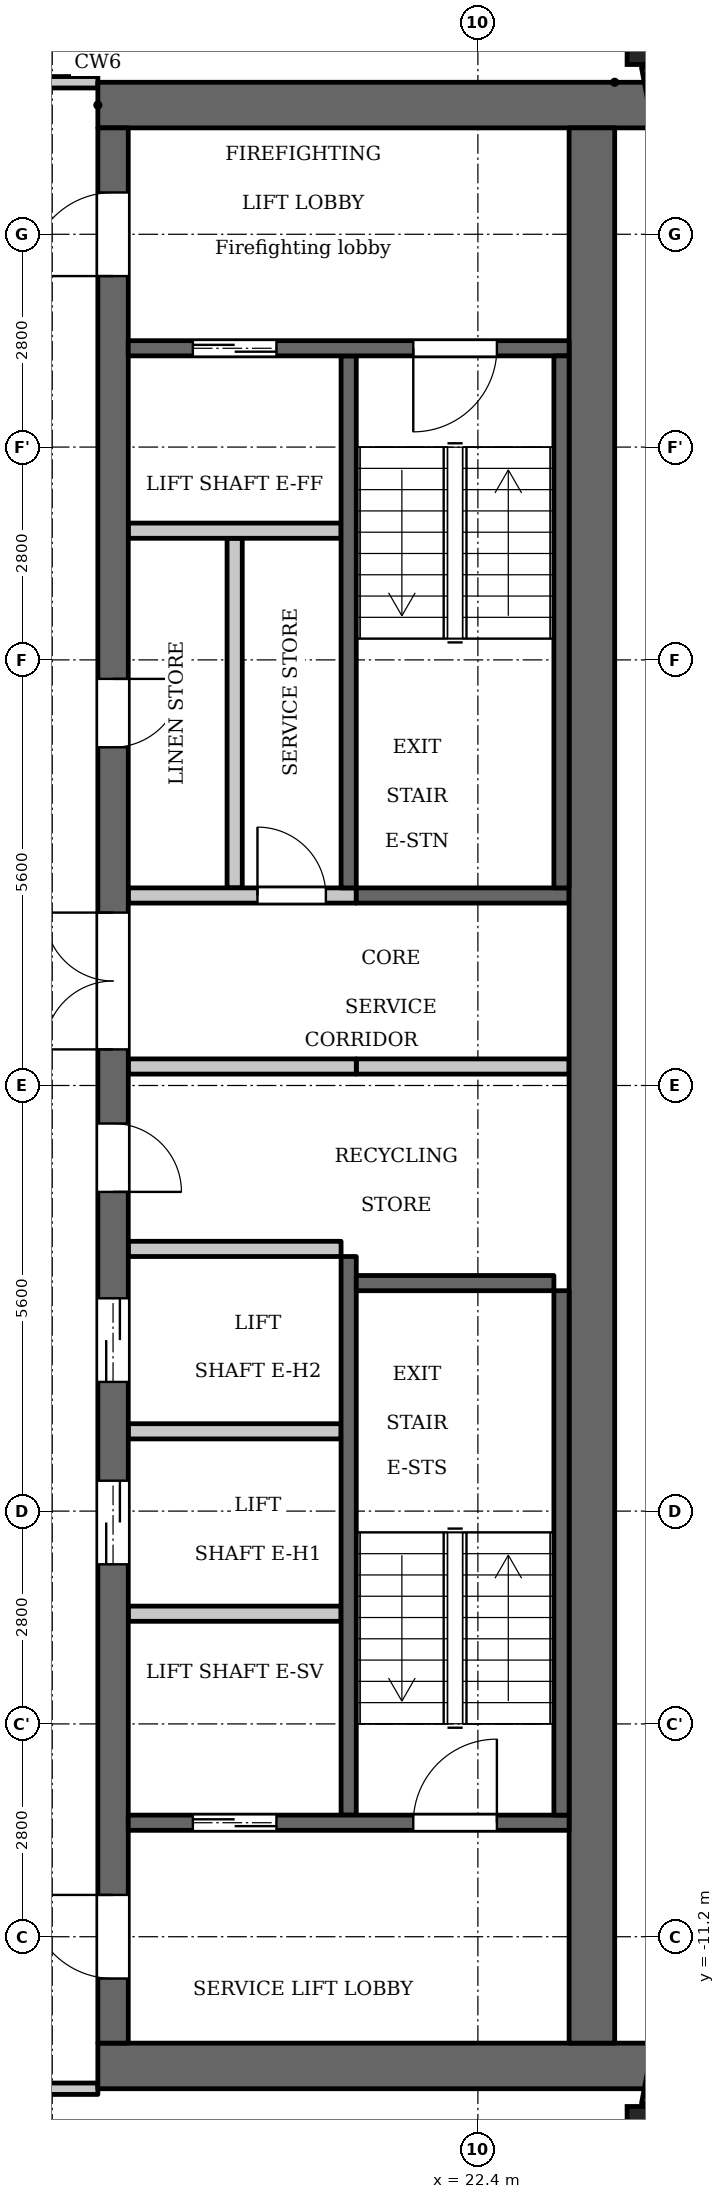
"""IFC4 building model, lengths in metres.
Left out: names, types, materials, properties, quantities, classifications, styles, units other than length and angle.
Written with IfcOpenShell. Run it as: python <this file> out.ifc"""

import sys

from ifc_helpers import new_model, si_unit, direction, frame, frame_2d, origin, origin_2d, place, context, subcontext, project, spatial, rectangle, extrude, element, fill, save


model = new_model("IFC4")
c1 = context("Model", 3, precision=1e-05, world=origin(), true_north=direction((0.0, 1.0)))
c2 = subcontext(c1, "Body", "Model", "MODEL_VIEW")
j1 = project(units=[si_unit("LENGTHUNIT", "METRE"), si_unit("PLANEANGLEUNIT", "RADIAN")], contexts=[c1])
p1 = place(None, origin())
s1 = spatial("IfcSite", under=j1, at=p1, CompositionType="ELEMENT")
p2 = place(p1, origin())
s2 = spatial("IfcBuilding", under=s1, at=p2, CompositionType="ELEMENT")
p3 = place(p2, frame((0.0, 0.0, 266.2)))
s3 = spatial("IfcBuildingStorey", under=s2, at=p3, CompositionType="ELEMENT", Elevation=266.2)
for number, where, z_axis, x_axis in (
    (1, (24.738, -13.809, 0.0), (0.0, 0.0, 1.0), (1.0, 0.0, 0.0)),
    (2, (24.738, 13.809, 0.0), (0.0, 0.0, 1.0), (1.0, 0.0, 0.0)),
):
    element("IfcColumn", number, at=place(p3, frame(where, z_axis=z_axis, x_axis=x_axis)), inside=s3, PredefinedType="COLUMN", context=c2, shape_type="SweptSolid", body=[
        extrude(rectangle(XDim=0.75, YDim=0.75, at=origin_2d()), origin(), (0.0, 0.0, 1.0), 3.5),
    ])
for number, where, z_axis, x_axis in (
    (3, (24.7, -13.42, 0.0), (0.0, 0.0, 1.0), (0.187, 0.982, 0.0)),
    (4, (25.053, 11.572, 0.0), (0.0, 0.0, 1.0), (-0.187, 0.982, 0.0)),
):
    element("IfcWall", number, at=place(p3, frame(where, z_axis=z_axis, x_axis=x_axis)), inside=s3, PredefinedType="SOLIDWALL", context=c2, shape_type="SweptSolid", body=[
        extrude(rectangle(XDim=1.881, YDim=0.3, at=frame_2d((0.941, 0.0))), origin(), (0.0, 0.0, 1.0), 2.55),
    ])
p4 = place(p3, frame((20.7, 2.6, 0.0), z_axis=(0.0, 0.0, 1.0), x_axis=(0.0, 1.0, 0.0)))
e5 = element("IfcWall", 5, at=p4, inside=s3, PredefinedType="SHEAR", context=c2, shape_type="SweptSolid", body=[
    extrude(rectangle(XDim=7.0, YDim=0.2, at=frame_2d((3.5, 0.0))), origin(), (0.0, 0.0, 1.0), 3.2),
])
p5 = place(p3, frame((20.7, -9.6, 0.0), z_axis=(0.0, 0.0, 1.0), x_axis=(0.0, 1.0, 0.0)))
e6 = element("IfcWall", 6, at=p5, inside=s3, PredefinedType="SHEAR", context=c2, shape_type="SweptSolid", body=[
    extrude(rectangle(XDim=7.35, YDim=0.2, at=frame_2d((3.675, 0.0))), origin(), (0.0, 0.0, 1.0), 3.2),
])
p6 = place(p3, frame((20.8, 2.5, 0.0), z_axis=(0.0, 0.0, 1.0), x_axis=(1.0, 0.0, 0.0)))
e7 = element("IfcWall", 7, at=p6, inside=s3, PredefinedType="SHEAR", context=c2, shape_type="SweptSolid", body=[
    extrude(rectangle(XDim=2.8, YDim=0.2, at=frame_2d((1.4, 0.0))), origin(), (0.0, 0.0, 1.0), 3.2),
])
p7 = place(p3, frame((20.8, 0.25, 0.0), z_axis=(0.0, 0.0, 1.0), x_axis=(1.0, 0.0, 0.0)))
e8 = element("IfcWall", 8, at=p7, inside=s3, PredefinedType="PARTITIONING", context=c2, shape_type="SweptSolid", body=[
    extrude(rectangle(XDim=2.8, YDim=0.2, at=frame_2d((1.4, 0.0))), origin(), (0.0, 0.0, 1.0), 3.2),
])
for number, where, z_axis, x_axis in (
    (9, (17.4, 12.9, 0.0), (0.0, 0.0, 1.0), (1.0, 0.0, 0.0)),
    (10, (17.4, -12.9, 0.0), (0.0, 0.0, 1.0), (1.0, 0.0, 0.0)),
):
    element("IfcWall", number, at=place(p3, frame(where, z_axis=z_axis, x_axis=x_axis)), inside=s3, PredefinedType="SHEAR", context=c2, shape_type="SweptSolid", body=[
        extrude(rectangle(XDim=7.32, YDim=0.6, at=frame_2d((3.66, 0.0))), origin(), (0.0, 0.0, 1.0), 3.2),
    ])
p8 = place(p3, frame((19.2, 2.6, 0.0), z_axis=(0.0, 0.0, 1.0), x_axis=(0.0, 1.0, 0.0)))
e11 = element("IfcWall", 11, at=p8, inside=s3, PredefinedType="PARTITIONING", context=c2, shape_type="SweptSolid", body=[
    extrude(rectangle(XDim=4.6, YDim=0.2, at=frame_2d((2.3, 0.0))), origin(), (0.0, 0.0, 1.0), 3.2),
])
p9 = place(p3, frame((17.6, -12.6, 0.0), z_axis=(0.0, 0.0, 1.0), x_axis=(0.0, 1.0, 0.0)))
e12 = element("IfcWall", 12, at=p9, inside=s3, PredefinedType="SHEAR", context=c2, shape_type="SweptSolid", body=[
    extrude(rectangle(XDim=25.2, YDim=0.4, at=frame_2d((12.6, 0.0))), origin(), (0.0, 0.0, 1.0), 3.2),
])
p10 = place(p9, frame((6.3, 0.0, 0.0)))
e13 = element("IfcOpeningElement", 13, at=p10, cuts=e12, PredefinedType="OPENING", context=c2, shape_type="SweptSolid", body=[
    extrude(rectangle(XDim=1.1, YDim=2.1, at=frame_2d((0.55, 1.05))), frame((0.0, 0.21, 0.0), z_axis=(0.0, -1.0, 0.0), x_axis=(1.0, 0.0, 0.0)), (0.0, 0.0, 1.0), 0.42),
])
p11 = place(p9, frame((8.7, 0.0, 0.0)))
e14 = element("IfcOpeningElement", 14, at=p11, cuts=e12, PredefinedType="OPENING", context=c2, shape_type="SweptSolid", body=[
    extrude(rectangle(XDim=1.1, YDim=2.1, at=frame_2d((0.55, 1.05))), frame((0.0, 0.21, 0.0), z_axis=(0.0, -1.0, 0.0), x_axis=(1.0, 0.0, 0.0)), (0.0, 0.0, 1.0), 0.42),
])
p12 = place(p9, frame((11.2, 0.0, 0.0)))
e15 = element("IfcOpeningElement", 15, at=p12, cuts=e12, PredefinedType="OPENING", context=c2, shape_type="SweptSolid", body=[
    extrude(rectangle(XDim=0.9, YDim=2.1, at=frame_2d((0.45, 1.05))), frame((0.0, 0.21, 0.0), z_axis=(0.0, -1.0, 0.0), x_axis=(1.0, 0.0, 0.0)), (0.0, 0.0, 1.0), 0.42),
])
p13 = place(p9, frame((17.05, 0.0, 0.0)))
e16 = element("IfcOpeningElement", 16, at=p13, cuts=e12, PredefinedType="OPENING", context=c2, shape_type="SweptSolid", body=[
    extrude(rectangle(XDim=0.9, YDim=2.1, at=frame_2d((0.45, 1.05))), frame((0.0, 0.21, 0.0), z_axis=(0.0, -1.0, 0.0), x_axis=(1.0, 0.0, 0.0)), (0.0, 0.0, 1.0), 0.42),
])
p14 = place(p9, frame((23.25, 0.0, 0.0)))
e17 = element("IfcOpeningElement", 17, at=p14, cuts=e12, PredefinedType="OPENING", context=c2, shape_type="SweptSolid", body=[
    extrude(rectangle(XDim=1.1, YDim=2.1, at=frame_2d((0.55, 1.05))), frame((0.0, 0.21, 0.0), z_axis=(0.0, -1.0, 0.0), x_axis=(1.0, 0.0, 0.0)), (0.0, 0.0, 1.0), 0.42),
])
p15 = place(p9, frame((0.85, 0.0, 0.0)))
e18 = element("IfcOpeningElement", 18, at=p15, cuts=e12, PredefinedType="OPENING", context=c2, shape_type="SweptSolid", body=[
    extrude(rectangle(XDim=1.1, YDim=2.1, at=frame_2d((0.55, 1.05))), frame((0.0, 0.21, 0.0), z_axis=(0.0, -1.0, 0.0), x_axis=(1.0, 0.0, 0.0)), (0.0, 0.0, 1.0), 0.42),
])
p16 = place(p9, frame((13.075, 0.0, 0.0)))
e19 = element("IfcOpeningElement", 19, at=p16, cuts=e12, PredefinedType="OPENING", context=c2, shape_type="SweptSolid", body=[
    extrude(rectangle(XDim=1.8, YDim=2.1, at=frame_2d((0.9, 1.05))), frame((0.0, 0.21, 0.0), z_axis=(0.0, -1.0, 0.0), x_axis=(1.0, 0.0, 0.0)), (0.0, 0.0, 1.0), 0.42),
])
p17 = place(p3, frame((23.9, -12.6, 0.0), z_axis=(0.0, 0.0, 1.0), x_axis=(0.0, 1.0, 0.0)))
e20 = element("IfcWall", 20, at=p17, inside=s3, PredefinedType="SHEAR", context=c2, shape_type="SweptSolid", body=[
    extrude(rectangle(XDim=25.2, YDim=0.6, at=frame_2d((12.6, 0.0))), origin(), (0.0, 0.0, 1.0), 3.2),
])
p18 = place(p3, frame((17.8, -9.7, 0.0), z_axis=(0.0, 0.0, 1.0), x_axis=(1.0, 0.0, 0.0)))
e21 = element("IfcWall", 21, at=p18, inside=s3, PredefinedType="SHEAR", context=c2, shape_type="SweptSolid", body=[
    extrude(rectangle(XDim=5.8, YDim=0.2, at=frame_2d((2.9, 0.0))), origin(), (0.0, 0.0, 1.0), 3.2),
])
p19 = place(p18, frame((0.85, 0.0, 0.0)))
e22 = element("IfcOpeningElement", 22, at=p19, cuts=e21, PredefinedType="OPENING", context=c2, shape_type="SweptSolid", body=[
    extrude(rectangle(XDim=1.1, YDim=2.1, at=frame_2d((0.55, 1.05))), frame((0.0, 0.11, 0.0), z_axis=(0.0, -1.0, 0.0), x_axis=(1.0, 0.0, 0.0)), (0.0, 0.0, 1.0), 0.22),
])
p20 = place(p18, frame((3.75, 0.0, 0.0)))
e23 = element("IfcOpeningElement", 23, at=p20, cuts=e21, PredefinedType="OPENING", context=c2, shape_type="SweptSolid", body=[
    extrude(rectangle(XDim=1.1, YDim=2.1, at=frame_2d((0.55, 1.05))), frame((0.0, 0.11, 0.0), z_axis=(0.0, -1.0, 0.0), x_axis=(1.0, 0.0, 0.0)), (0.0, 0.0, 1.0), 0.22),
])
for number, where, z_axis, x_axis in (
    (24, (17.8, -6.95, 0.0), (0.0, 0.0, 1.0), (1.0, 0.0, 0.0)),
    (25, (17.8, -4.55, 0.0), (0.0, 0.0, 1.0), (1.0, 0.0, 0.0)),
    (26, (17.8, -2.15, 0.0), (0.0, 0.0, 1.0), (1.0, 0.0, 0.0)),
):
    element("IfcWall", number, at=place(p3, frame(where, z_axis=z_axis, x_axis=x_axis)), inside=s3, PredefinedType="PARTITIONING", context=c2, shape_type="SweptSolid", body=[
        extrude(rectangle(XDim=2.8, YDim=0.2, at=frame_2d((1.4, 0.0))), origin(), (0.0, 0.0, 1.0), 3.2),
    ])
p21 = place(p3, frame((17.8, 0.25, 0.0), z_axis=(0.0, 0.0, 1.0), x_axis=(1.0, 0.0, 0.0)))
e27 = element("IfcWall", 27, at=p21, inside=s3, PredefinedType="PARTITIONING", context=c2, shape_type="SweptSolid", body=[
    extrude(rectangle(XDim=3.0, YDim=0.2, at=frame_2d((1.5, 0.0))), origin(), (0.0, 0.0, 1.0), 3.2),
])
p22 = place(p3, frame((17.8, 2.5, 0.0), z_axis=(0.0, 0.0, 1.0), x_axis=(1.0, 0.0, 0.0)))
e28 = element("IfcWall", 28, at=p22, inside=s3, PredefinedType="PARTITIONING", context=c2, shape_type="SweptSolid", body=[
    extrude(rectangle(XDim=3.0, YDim=0.2, at=frame_2d((1.5, 0.0))), origin(), (0.0, 0.0, 1.0), 3.2),
])
p23 = place(p22, frame((1.7, 0.0, 0.0)))
e29 = element("IfcOpeningElement", 29, at=p23, cuts=e28, PredefinedType="OPENING", context=c2, shape_type="SweptSolid", body=[
    extrude(rectangle(XDim=0.9, YDim=2.1, at=frame_2d((0.45, 1.05))), frame((0.0, 0.11, 0.0), z_axis=(0.0, -1.0, 0.0), x_axis=(1.0, 0.0, 0.0)), (0.0, 0.0, 1.0), 0.22),
])
p24 = place(p3, frame((17.8, 7.3, 0.0), z_axis=(0.0, 0.0, 1.0), x_axis=(1.0, 0.0, 0.0)))
e30 = element("IfcWall", 30, at=p24, inside=s3, PredefinedType="PARTITIONING", context=c2, shape_type="SweptSolid", body=[
    extrude(rectangle(XDim=2.8, YDim=0.2, at=frame_2d((1.4, 0.0))), origin(), (0.0, 0.0, 1.0), 3.2),
])
p25 = place(p3, frame((17.8, 9.7, 0.0), z_axis=(0.0, 0.0, 1.0), x_axis=(1.0, 0.0, 0.0)))
e31 = element("IfcWall", 31, at=p25, inside=s3, PredefinedType="SHEAR", context=c2, shape_type="SweptSolid", body=[
    extrude(rectangle(XDim=5.8, YDim=0.2, at=frame_2d((2.9, 0.0))), origin(), (0.0, 0.0, 1.0), 3.2),
])
p26 = place(p25, frame((0.85, 0.0, 0.0)))
e32 = element("IfcOpeningElement", 32, at=p26, cuts=e31, PredefinedType="OPENING", context=c2, shape_type="SweptSolid", body=[
    extrude(rectangle(XDim=1.1, YDim=2.1, at=frame_2d((0.55, 1.05))), frame((0.0, 0.11, 0.0), z_axis=(0.0, -1.0, 0.0), x_axis=(1.0, 0.0, 0.0)), (0.0, 0.0, 1.0), 0.22),
])
p27 = place(p25, frame((3.75, 0.0, 0.0)))
e33 = element("IfcOpeningElement", 33, at=p27, cuts=e31, PredefinedType="OPENING", context=c2, shape_type="SweptSolid", body=[
    extrude(rectangle(XDim=1.1, YDim=2.1, at=frame_2d((0.55, 1.05))), frame((0.0, 0.11, 0.0), z_axis=(0.0, -1.0, 0.0), x_axis=(1.0, 0.0, 0.0)), (0.0, 0.0, 1.0), 0.22),
])
p28 = place(p3, frame((23.5, 2.6, 0.0), z_axis=(0.0, 0.0, 1.0), x_axis=(0.0, 1.0, 0.0)))
e34 = element("IfcWall", 34, at=p28, inside=s3, PredefinedType="SHEAR", context=c2, shape_type="SweptSolid", body=[
    extrude(rectangle(XDim=7.0, YDim=0.2, at=frame_2d((3.5, 0.0))), origin(), (0.0, 0.0, 1.0), 3.2),
])
p29 = place(p3, frame((23.5, -9.6, 0.0), z_axis=(0.0, 0.0, 1.0), x_axis=(0.0, 1.0, 0.0)))
e35 = element("IfcWall", 35, at=p29, inside=s3, PredefinedType="SHEAR", context=c2, shape_type="SweptSolid", body=[
    extrude(rectangle(XDim=6.9, YDim=0.2, at=frame_2d((3.45, 0.0))), origin(), (0.0, 0.0, 1.0), 3.2),
])
p30 = place(p3, frame((20.8, -2.6, 0.0), z_axis=(0.0, 0.0, 1.0), x_axis=(1.0, 0.0, 0.0)))
e36 = element("IfcWall", 36, at=p30, inside=s3, PredefinedType="SHEAR", context=c2, shape_type="SweptSolid", body=[
    extrude(rectangle(XDim=2.6, YDim=0.2, at=frame_2d((1.3, 0.0))), origin(), (0.0, 0.0, 1.0), 3.2),
])
p31 = place(p3, frame((15.075, -13.2, 0.0), z_axis=(0.0, 0.0, 1.0), x_axis=(1.0, 0.0, 0.0)))
e37 = element("IfcWall", 37, at=p31, inside=s3, PredefinedType="PARTITIONING", context=c2, shape_type="SweptSolid", body=[
    extrude(rectangle(XDim=2.325, YDim=0.15, at=frame_2d((1.163, 0.0))), origin(), (0.0, 0.0, 1.0), 3.2),
])
p32 = place(p31, frame((0.575, 0.0, 0.0)))
e38 = element("IfcOpeningElement", 38, at=p32, cuts=e37, PredefinedType="OPENING", context=c2, shape_type="SweptSolid", body=[
    extrude(rectangle(XDim=1.0, YDim=2.1, at=frame_2d((0.5, 1.05))), frame((0.0, 0.085, 0.0), z_axis=(0.0, -1.0, 0.0), x_axis=(1.0, 0.0, 0.0)), (0.0, 0.0, 1.0), 0.17),
])
p33 = place(p3, frame((15.075, 13.2, 0.0), z_axis=(0.0, 0.0, 1.0), x_axis=(1.0, 0.0, 0.0)))
e39 = element("IfcWall", 39, at=p33, inside=s3, PredefinedType="PARTITIONING", context=c2, shape_type="SweptSolid", body=[
    extrude(rectangle(XDim=2.325, YDim=0.15, at=frame_2d((1.163, 0.0))), origin(), (0.0, 0.0, 1.0), 3.2),
])
p34 = place(p33, frame((0.675, 0.0, 0.0)))
e40 = element("IfcOpeningElement", 40, at=p34, cuts=e39, PredefinedType="OPENING", context=c2, shape_type="SweptSolid", body=[
    extrude(rectangle(XDim=1.0, YDim=2.1, at=frame_2d((0.5, 1.05))), frame((0.0, 0.085, 0.0), z_axis=(0.0, -1.0, 0.0), x_axis=(1.0, 0.0, 0.0)), (0.0, 0.0, 1.0), 0.17),
])
p35 = place(p19, origin())
e41 = element("IfcDoor", 41, at=p35, inside=s3, OperationType="DOUBLE_DOOR_SLIDING", PredefinedType="DOOR", context=c2, shape_type="SweptSolid", body=[
    extrude(rectangle(XDim=1.1, YDim=2.1, at=frame_2d((0.55, 1.05))), frame((0.0, 0.025, 0.0), z_axis=(0.0, -1.0, 0.0), x_axis=(1.0, 0.0, 0.0)), (0.0, 0.0, 1.0), 0.05),
])
fill(e22, e41)
p36 = place(p10, origin())
e42 = element("IfcDoor", 42, at=p36, inside=s3, OperationType="DOUBLE_DOOR_SLIDING", PredefinedType="DOOR", context=c2, shape_type="SweptSolid", body=[
    extrude(rectangle(XDim=1.1, YDim=2.1, at=frame_2d((0.55, 1.05))), frame((0.0, 0.025, 0.0), z_axis=(0.0, -1.0, 0.0), x_axis=(1.0, 0.0, 0.0)), (0.0, 0.0, 1.0), 0.05),
])
fill(e13, e42)
p37 = place(p11, origin())
e43 = element("IfcDoor", 43, at=p37, inside=s3, OperationType="DOUBLE_DOOR_SLIDING", PredefinedType="DOOR", context=c2, shape_type="SweptSolid", body=[
    extrude(rectangle(XDim=1.1, YDim=2.1, at=frame_2d((0.55, 1.05))), frame((0.0, 0.025, 0.0), z_axis=(0.0, -1.0, 0.0), x_axis=(1.0, 0.0, 0.0)), (0.0, 0.0, 1.0), 0.05),
])
fill(e14, e43)
p38 = place(p12, origin())
e44 = element("IfcDoor", 44, at=p38, inside=s3, OperationType="SINGLE_SWING_LEFT", PredefinedType="DOOR", context=c2, shape_type="SweptSolid", body=[
    extrude(rectangle(XDim=0.9, YDim=2.1, at=frame_2d((0.45, 1.05))), frame((0.0, 0.025, 0.0), z_axis=(0.0, -1.0, 0.0), x_axis=(1.0, 0.0, 0.0)), (0.0, 0.0, 1.0), 0.05),
])
fill(e15, e44)
p39 = place(p13, origin())
e45 = element("IfcDoor", 45, at=p39, inside=s3, OperationType="SINGLE_SWING_RIGHT", PredefinedType="DOOR", context=c2, shape_type="SweptSolid", body=[
    extrude(rectangle(XDim=0.9, YDim=2.1, at=frame_2d((0.45, 1.05))), frame((0.0, 0.025, 0.0), z_axis=(0.0, -1.0, 0.0), x_axis=(1.0, 0.0, 0.0)), (0.0, 0.0, 1.0), 0.05),
])
fill(e16, e45)
p40 = place(p23, origin())
e46 = element("IfcDoor", 46, at=p40, inside=s3, OperationType="SINGLE_SWING_RIGHT", PredefinedType="DOOR", context=c2, shape_type="SweptSolid", body=[
    extrude(rectangle(XDim=0.9, YDim=2.1, at=frame_2d((0.45, 1.05))), frame((0.0, 0.025, 0.0), z_axis=(0.0, -1.0, 0.0), x_axis=(1.0, 0.0, 0.0)), (0.0, 0.0, 1.0), 0.05),
])
fill(e29, e46)
p41 = place(p26, origin())
e47 = element("IfcDoor", 47, at=p41, inside=s3, OperationType="DOUBLE_DOOR_SLIDING", PredefinedType="DOOR", context=c2, shape_type="SweptSolid", body=[
    extrude(rectangle(XDim=1.1, YDim=2.1, at=frame_2d((0.55, 1.05))), frame((0.0, 0.025, 0.0), z_axis=(0.0, -1.0, 0.0), x_axis=(1.0, 0.0, 0.0)), (0.0, 0.0, 1.0), 0.05),
])
fill(e32, e47)
p42 = place(p14, origin())
e48 = element("IfcDoor", 48, at=p42, inside=s3, OperationType="SINGLE_SWING_RIGHT", PredefinedType="DOOR", context=c2, shape_type="SweptSolid", body=[
    extrude(rectangle(XDim=1.1, YDim=2.1, at=frame_2d((0.55, 1.05))), frame((0.0, 0.025, 0.0), z_axis=(0.0, -1.0, 0.0), x_axis=(1.0, 0.0, 0.0)), (0.0, 0.0, 1.0), 0.05),
])
fill(e17, e48)
p43 = place(p15, origin())
e49 = element("IfcDoor", 49, at=p43, inside=s3, OperationType="SINGLE_SWING_LEFT", PredefinedType="DOOR", context=c2, shape_type="SweptSolid", body=[
    extrude(rectangle(XDim=1.1, YDim=2.1, at=frame_2d((0.55, 1.05))), frame((0.0, 0.025, 0.0), z_axis=(0.0, -1.0, 0.0), x_axis=(1.0, 0.0, 0.0)), (0.0, 0.0, 1.0), 0.05),
])
fill(e18, e49)
p44 = place(p27, origin())
e50 = element("IfcDoor", 50, at=p44, inside=s3, OperationType="SINGLE_SWING_LEFT", PredefinedType="DOOR", context=c2, shape_type="SweptSolid", body=[
    extrude(rectangle(XDim=1.1, YDim=2.1, at=frame_2d((0.55, 1.05))), frame((0.0, 0.025, 0.0), z_axis=(0.0, -1.0, 0.0), x_axis=(1.0, 0.0, 0.0)), (0.0, 0.0, 1.0), 0.05),
])
fill(e33, e50)
p45 = place(p20, origin())
e51 = element("IfcDoor", 51, at=p45, inside=s3, OperationType="SINGLE_SWING_LEFT", PredefinedType="DOOR", context=c2, shape_type="SweptSolid", body=[
    extrude(rectangle(XDim=1.1, YDim=2.1, at=frame_2d((0.55, 1.05))), frame((0.0, 0.025, 0.0), z_axis=(0.0, -1.0, 0.0), x_axis=(1.0, 0.0, 0.0)), (0.0, 0.0, 1.0), 0.05),
])
fill(e23, e51)
p46 = place(p16, origin())
e52 = element("IfcDoor", 52, at=p46, inside=s3, OperationType="DOUBLE_DOOR_SINGLE_SWING", PredefinedType="DOOR", context=c2, shape_type="SweptSolid", body=[
    extrude(rectangle(XDim=1.8, YDim=2.1, at=frame_2d((0.9, 1.05))), frame((0.0, 0.025, 0.0), z_axis=(0.0, -1.0, 0.0), x_axis=(1.0, 0.0, 0.0)), (0.0, 0.0, 1.0), 0.05),
])
fill(e19, e52)
save(model, sys.argv[1])
